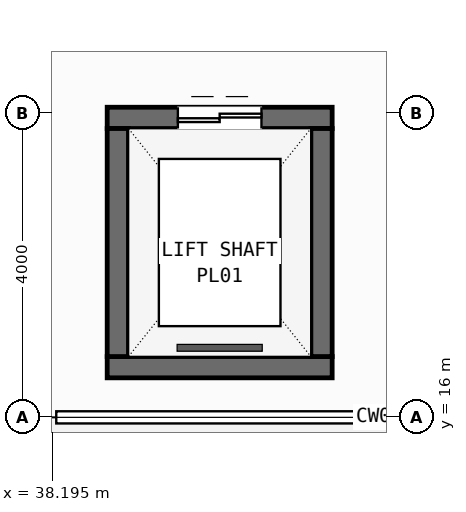
"""IFC4 building model, lengths in metres.
Left out: names, types, materials, properties, quantities, classifications, styles, units other than length and angle.
Written with IfcOpenShell. Run it as: python <this file> out.ifc"""

import sys

from ifc_helpers import new_model, si_unit, direction, frame, frame_2d, origin, place, context, subcontext, project, spatial, rectangle, extrude, element, fill, save


model = new_model("IFC4")
c1 = context("Model", 3, precision=1e-05, world=origin(), true_north=direction((0.0, 1.0)))
c2 = subcontext(c1, "Body", "Model", "MODEL_VIEW")
j1 = project(units=[si_unit("LENGTHUNIT", "METRE"), si_unit("PLANEANGLEUNIT", "RADIAN")], contexts=[c1])
p1 = place(None, origin())
s1 = spatial("IfcSite", under=j1, at=p1, CompositionType="ELEMENT")
p2 = place(p1, origin())
s2 = spatial("IfcBuilding", under=s1, at=p2, CompositionType="ELEMENT")
p3 = place(p2, origin())
s3 = spatial("IfcBuildingStorey", under=s2, at=p3, CompositionType="ELEMENT", Elevation=0.0)
p4 = place(p3, frame((38.92, 16.66, 0.0), z_axis=(0.0, 0.0, 1.0), x_axis=(1.0, 0.0, 0.0)))
e1 = element("IfcWall", 1, at=p4, inside=s3, PredefinedType="SHEAR", context=c2, shape_type="SweptSolid", body=[
    extrude(rectangle(XDim=2.96, YDim=0.28, at=frame_2d((1.48, 0.0))), origin(), (0.0, 0.0, 1.0), 6.0),
])
p5 = place(p3, frame((38.92, 19.94, 0.0), z_axis=(0.0, 0.0, 1.0), x_axis=(1.0, 0.0, 0.0)))
e2 = element("IfcWall", 2, at=p5, inside=s3, PredefinedType="SHEAR", context=c2, shape_type="SweptSolid", body=[
    extrude(rectangle(XDim=2.96, YDim=0.28, at=frame_2d((1.48, 0.0))), origin(), (0.0, 0.0, 1.0), 6.0),
])
p6 = place(p5, frame((0.93, 0.0, 0.0)))
e3 = element("IfcOpeningElement", 3, at=p6, cuts=e2, PredefinedType="OPENING", context=c2, shape_type="SweptSolid", body=[
    extrude(rectangle(XDim=1.1, YDim=2.15, at=frame_2d((0.55, 1.075))), frame((0.0, 0.15, 0.0), z_axis=(0.0, -1.0, 0.0), x_axis=(1.0, 0.0, 0.0)), (0.0, 0.0, 1.0), 0.3),
])
for number, where, z_axis, x_axis in (
    (4, (39.06, 16.8, 0.0), (0.0, 0.0, 1.0), (0.0, 1.0, 0.0)),
    (5, (41.74, 16.8, 0.0), (0.0, 0.0, 1.0), (0.0, 1.0, 0.0)),
):
    element("IfcWall", number, at=place(p3, frame(where, z_axis=z_axis, x_axis=x_axis)), inside=s3, PredefinedType="SHEAR", context=c2, shape_type="SweptSolid", body=[
        extrude(rectangle(XDim=3.0, YDim=0.28, at=frame_2d((1.5, 0.0))), origin(), (0.0, 0.0, 1.0), 6.0),
    ])
p7 = place(p6, origin())
e6 = element("IfcDoor", 6, at=p7, inside=s3, OperationType="DOUBLE_DOOR_SLIDING", PredefinedType="DOOR", context=c2, shape_type="SweptSolid", body=[
    extrude(rectangle(XDim=1.1, YDim=2.15, at=frame_2d((0.55, 1.075))), frame((0.0, 0.025, 0.0), z_axis=(0.0, -1.0, 0.0), x_axis=(1.0, 0.0, 0.0)), (0.0, 0.0, 1.0), 0.05),
])
fill(e3, e6)
save(model, sys.argv[1])
